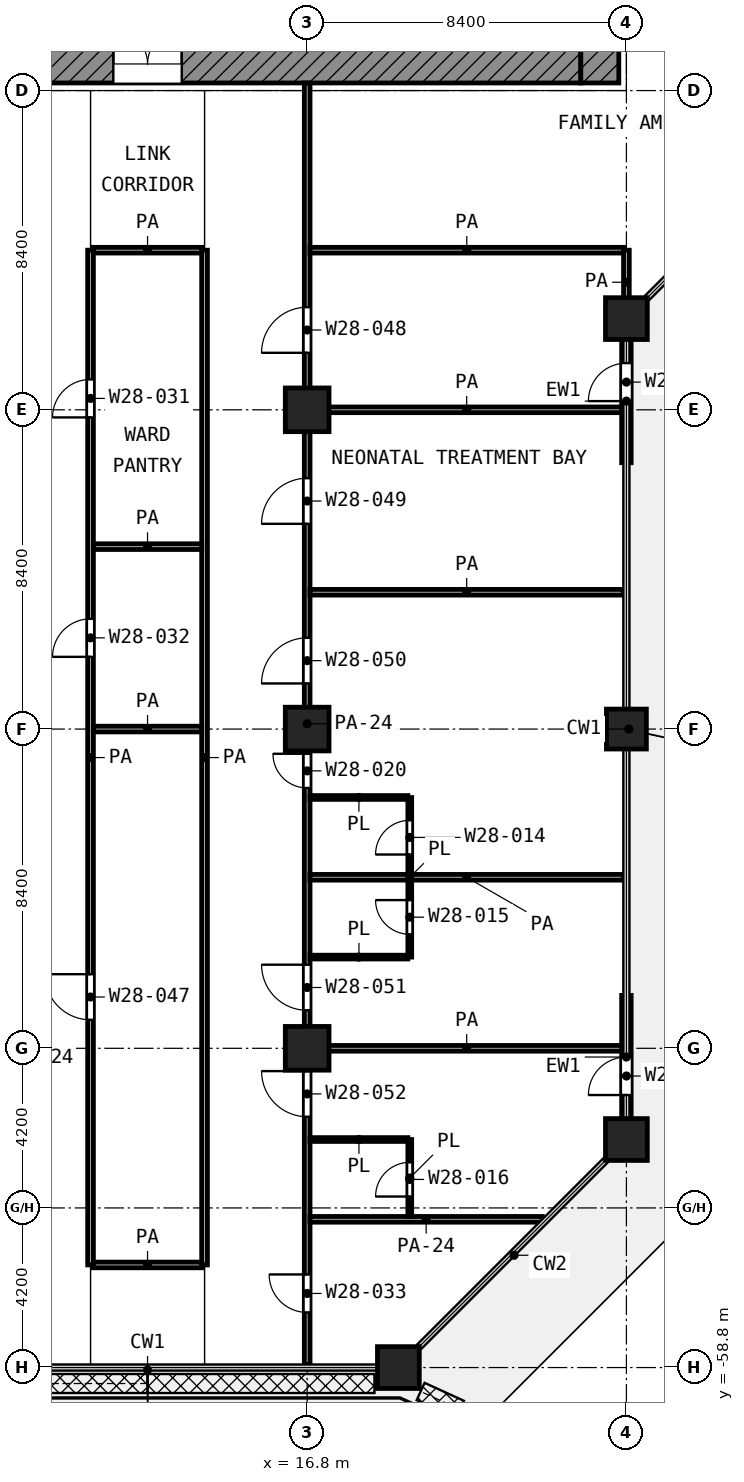
"""IFC4 building model, lengths in metres.
Left out: names, types, materials, properties, quantities, classifications, styles, units other than length and angle.
Written with IfcOpenShell. Run it as: python <this file> out.ifc"""

import sys

from ifc_helpers import new_model, si_unit, direction, frame, frame_2d, origin, origin_2d, place, context, subcontext, project, spatial, rectangle, extrude, element, fill, save


model = new_model("IFC4")
c1 = context("Model", 3, precision=1e-05, world=origin(), true_north=direction((0.0, 1.0)))
c2 = subcontext(c1, "Body", "Model", "MODEL_VIEW")
j1 = project(units=[si_unit("LENGTHUNIT", "METRE"), si_unit("PLANEANGLEUNIT", "RADIAN")], contexts=[c1])
p1 = place(None, origin())
s1 = spatial("IfcSite", under=j1, at=p1, CompositionType="ELEMENT")
p2 = place(p1, origin())
s2 = spatial("IfcBuilding", under=s1, at=p2, CompositionType="ELEMENT")
p3 = place(p2, frame((0.0, 0.0, 145.0)))
s3 = spatial("IfcBuildingStorey", under=s2, at=p3, CompositionType="ELEMENT", Elevation=145.0)
p4 = place(p3, frame((25.2, -31.2, 0.0), z_axis=(0.0, 0.0, 1.0), x_axis=(1.0, 0.0, 0.0)))
e1 = element("IfcColumn", 1, at=p4, inside=s3, PredefinedType="COLUMN", context=c2, shape_type="SweptSolid", body=[
    extrude(rectangle(XDim=1.1, YDim=1.1, at=origin_2d()), origin(), (0.0, 0.0, 1.0), 4.2),
])
for number, where, z_axis, x_axis in (
    (2, (16.8, -33.6, 0.0), (0.0, 0.0, 1.0), (1.0, 0.0, 0.0)),
    (3, (16.8, -42.0, 0.0), (0.0, 0.0, 1.0), (1.0, 0.0, 0.0)),
):
    element("IfcColumn", number, at=place(p3, frame(where, z_axis=z_axis, x_axis=x_axis)), inside=s3, PredefinedType="COLUMN", context=c2, shape_type="SweptSolid", body=[
        extrude(rectangle(XDim=1.15, YDim=1.15, at=origin_2d()), origin(), (0.0, 0.0, 1.0), 4.2),
    ])
p5 = place(p3, frame((25.2, -42.0, 0.0), z_axis=(0.0, 0.0, 1.0), x_axis=(1.0, 0.0, 0.0)))
e4 = element("IfcColumn", 4, at=p5, inside=s3, PredefinedType="COLUMN", context=c2, shape_type="SweptSolid", body=[
    extrude(rectangle(XDim=1.05, YDim=1.05, at=origin_2d()), origin(), (0.0, 0.0, 1.0), 4.2),
])
p6 = place(p3, frame((16.8, -50.4, 0.0), z_axis=(0.0, 0.0, 1.0), x_axis=(1.0, 0.0, 0.0)))
e5 = element("IfcColumn", 5, at=p6, inside=s3, PredefinedType="COLUMN", context=c2, shape_type="SweptSolid", body=[
    extrude(rectangle(XDim=1.15, YDim=1.15, at=origin_2d()), origin(), (0.0, 0.0, 1.0), 4.2),
])
for number, where, z_axis, x_axis in (
    (6, (25.2, -52.8, 0.0), (0.0, 0.0, 1.0), (1.0, 0.0, 0.0)),
    (7, (19.2, -58.8, 0.0), (0.0, 0.0, 1.0), (1.0, 0.0, 0.0)),
):
    element("IfcColumn", number, at=place(p3, frame(where, z_axis=z_axis, x_axis=x_axis)), inside=s3, PredefinedType="COLUMN", context=c2, shape_type="SweptSolid", body=[
        extrude(rectangle(XDim=1.1, YDim=1.1, at=origin_2d()), origin(), (0.0, 0.0, 1.0), 4.2),
    ])
p7 = place(p3, frame((25.2, -52.25, 0.0), z_axis=(0.0, 0.0, 1.0), x_axis=(0.0, 1.0, 0.0)))
e8 = element("IfcWall", 8, at=p7, inside=s3, PredefinedType="SOLIDWALL", context=c2, shape_type="SweptSolid", body=[
    extrude(rectangle(XDim=3.242, YDim=0.25, at=frame_2d((1.621, 0.0))), origin(), (0.0, 0.0, 1.0), 3.48),
])
p8 = place(p7, frame((0.621, 0.0, 0.0)))
e9 = element("IfcOpeningElement", 9, at=p8, cuts=e8, PredefinedType="OPENING", context=c2, shape_type="SweptSolid", body=[
    extrude(rectangle(XDim=1.0, YDim=2.1, at=frame_2d((0.5, 1.05))), frame((0.0, 0.135, 0.0), z_axis=(0.0, -1.0, 0.0), x_axis=(1.0, 0.0, 0.0)), (0.0, 0.0, 1.0), 0.27),
])
p9 = place(p3, frame((25.2, -34.992, 0.0), z_axis=(0.0, 0.0, 1.0), x_axis=(0.0, 1.0, 0.0)))
e10 = element("IfcWall", 10, at=p9, inside=s3, PredefinedType="SOLIDWALL", context=c2, shape_type="SweptSolid", body=[
    extrude(rectangle(XDim=3.242, YDim=0.25, at=frame_2d((1.621, 0.0))), origin(), (0.0, 0.0, 1.0), 3.48),
])
p10 = place(p9, frame((1.621, 0.0, 0.0)))
e11 = element("IfcOpeningElement", 11, at=p10, cuts=e10, PredefinedType="OPENING", context=c2, shape_type="SweptSolid", body=[
    extrude(rectangle(XDim=1.0, YDim=2.1, at=frame_2d((0.5, 1.05))), frame((0.0, 0.135, 0.0), z_axis=(0.0, -1.0, 0.0), x_axis=(1.0, 0.0, 0.0)), (0.0, 0.0, 1.0), 0.27),
])
p11 = place(p3, frame((5.4, -24.5, 0.0), z_axis=(0.0, 0.0, 1.0), x_axis=(1.0, 0.0, 0.0)))
e12 = element("IfcWall", 12, at=p11, inside=s3, PredefinedType="SHEAR", context=c2, shape_type="SweptSolid", body=[
    extrude(rectangle(XDim=18.6, YDim=1.0, at=frame_2d((9.3, 0.0))), origin(), (0.0, 0.0, 1.0), 3.6),
])
p12 = place(p11, frame((6.3, 0.0, 0.0)))
e13 = element("IfcOpeningElement", 13, at=p12, cuts=e12, PredefinedType="OPENING", context=c2, shape_type="SweptSolid", body=[
    extrude(rectangle(XDim=1.8, YDim=2.1, at=frame_2d((0.9, 1.05))), frame((0.0, 0.51, 0.0), z_axis=(0.0, -1.0, 0.0), x_axis=(1.0, 0.0, 0.0)), (0.0, 0.0, 1.0), 1.02),
])
p13 = place(p3, frame((24.5, -25.0, 0.0), z_axis=(0.0, 0.0, 1.0), x_axis=(0.0, 1.0, 0.0)))
e14 = element("IfcWall", 14, at=p13, inside=s3, PredefinedType="SHEAR", context=c2, shape_type="SweptSolid", body=[
    extrude(rectangle(XDim=1.0, YDim=1.0, at=frame_2d((0.5, 0.0))), origin(), (0.0, 0.0, 1.0), 3.6),
])
for number, where, z_axis, x_axis in (
    (15, (16.875, -52.8, 0.0), (0.0, 0.0, 1.0), (1.0, 0.0, 0.0)),
    (16, (16.875, -48.0, 0.0), (0.0, 0.0, 1.0), (1.0, 0.0, 0.0)),
):
    element("IfcWall", number, at=place(p3, frame(where, z_axis=z_axis, x_axis=x_axis)), inside=s3, PredefinedType="PARTITIONING", context=c2, shape_type="SweptSolid", body=[
        extrude(rectangle(XDim=2.575, YDim=0.1, at=frame_2d((1.288, 0.0))), origin(), (0.0, 0.0, 1.0), 3.6),
    ])
p14 = place(p3, frame((16.875, -43.8, 0.0), z_axis=(0.0, 0.0, 1.0), x_axis=(1.0, 0.0, 0.0)))
e17 = element("IfcWall", 17, at=p14, inside=s3, PredefinedType="PARTITIONING", context=c2, shape_type="SweptSolid", body=[
    extrude(rectangle(XDim=2.574, YDim=0.1, at=frame_2d((1.287, 0.0))), origin(), (0.0, 0.0, 1.0), 3.6),
])
p15 = place(p3, frame((19.5, -54.825, 0.0), z_axis=(0.0, 0.0, 1.0), x_axis=(0.0, 1.0, 0.0)))
e18 = element("IfcWall", 18, at=p15, inside=s3, PredefinedType="PARTITIONING", context=c2, shape_type="SweptSolid", body=[
    extrude(rectangle(XDim=2.025, YDim=0.1, at=frame_2d((1.012, 0.0))), origin(), (0.0, 0.0, 1.0), 3.6),
])
p16 = place(p15, frame((0.525, 0.0, 0.0)))
e19 = element("IfcOpeningElement", 19, at=p16, cuts=e18, PredefinedType="OPENING", context=c2, shape_type="SweptSolid", body=[
    extrude(rectangle(XDim=0.9, YDim=2.1, at=frame_2d((0.45, 1.05))), frame((0.0, 0.06, 0.0), z_axis=(0.0, -1.0, 0.0), x_axis=(1.0, 0.0, 0.0)), (0.0, 0.0, 1.0), 0.12),
])
p17 = place(p3, frame((19.5, -48.0, 0.0), z_axis=(0.0, 0.0, 1.0), x_axis=(0.0, 1.0, 0.0)))
e20 = element("IfcWall", 20, at=p17, inside=s3, PredefinedType="PARTITIONING", context=c2, shape_type="SweptSolid", body=[
    extrude(rectangle(XDim=4.198, YDim=0.1, at=frame_2d((2.099, 0.0))), origin(), (0.0, 0.0, 1.0), 3.6),
])
p18 = place(p17, frame((2.699, 0.0, 0.0)))
e21 = element("IfcOpeningElement", 21, at=p18, cuts=e20, PredefinedType="OPENING", context=c2, shape_type="SweptSolid", body=[
    extrude(rectangle(XDim=0.9, YDim=2.1, at=frame_2d((0.45, 1.05))), frame((0.0, 0.06, 0.0), z_axis=(0.0, -1.0, 0.0), x_axis=(1.0, 0.0, 0.0)), (0.0, 0.0, 1.0), 0.12),
])
p19 = place(p17, frame((0.6, 0.0, 0.0)))
e22 = element("IfcOpeningElement", 22, at=p19, cuts=e20, PredefinedType="OPENING", context=c2, shape_type="SweptSolid", body=[
    extrude(rectangle(XDim=0.9, YDim=2.1, at=frame_2d((0.45, 1.05))), frame((0.0, 0.06, 0.0), z_axis=(0.0, -1.0, 0.0), x_axis=(1.0, 0.0, 0.0)), (0.0, 0.0, 1.0), 0.12),
])
p20 = place(p3, frame((11.175, -56.1, 0.0), z_axis=(0.0, 0.0, 1.0), x_axis=(1.0, 0.0, 0.0)))
e23 = element("IfcWall", 23, at=p20, inside=s3, PredefinedType="PARTITIONING", context=c2, shape_type="SweptSolid", body=[
    extrude(rectangle(XDim=2.85, YDim=0.15, at=frame_2d((1.425, 0.0))), origin(), (0.0, 0.0, 1.0), 3.6),
])
p21 = place(p3, frame((16.875, -54.9, 0.0), z_axis=(0.0, 0.0, 1.0), x_axis=(1.0, 0.0, 0.0)))
e24 = element("IfcWall", 24, at=p21, inside=s3, PredefinedType="PARTITIONING", context=c2, shape_type="SweptSolid", body=[
    extrude(rectangle(XDim=6.112, YDim=0.15, at=frame_2d((3.056, 0.0))), origin(), (0.0, 0.0, 1.0), 2.7),
])
for number, where, z_axis, x_axis in (
    (25, (16.875, -50.4, 0.0), (0.0, 0.0, 1.0), (1.0, 0.0, 0.0)),
    (26, (16.875, -45.9, 0.0), (0.0, 0.0, 1.0), (1.0, 0.0, 0.0)),
):
    element("IfcWall", number, at=place(p3, frame(where, z_axis=z_axis, x_axis=x_axis)), inside=s3, PredefinedType="PARTITIONING", context=c2, shape_type="SweptSolid", body=[
        extrude(rectangle(XDim=8.245, YDim=0.15, at=frame_2d((4.123, 0.0))), origin(), (0.0, 0.0, 1.0), 3.6),
    ])
p22 = place(p3, frame((11.175, -42.0, 0.0), z_axis=(0.0, 0.0, 1.0), x_axis=(1.0, 0.0, 0.0)))
e27 = element("IfcWall", 27, at=p22, inside=s3, PredefinedType="PARTITIONING", context=c2, shape_type="SweptSolid", body=[
    extrude(rectangle(XDim=2.85, YDim=0.15, at=frame_2d((1.425, 0.0))), origin(), (0.0, 0.0, 1.0), 3.6),
])
p23 = place(p3, frame((16.875, -38.4, 0.0), z_axis=(0.0, 0.0, 1.0), x_axis=(1.0, 0.0, 0.0)))
e28 = element("IfcWall", 28, at=p23, inside=s3, PredefinedType="PARTITIONING", context=c2, shape_type="SweptSolid", body=[
    extrude(rectangle(XDim=8.245, YDim=0.15, at=frame_2d((4.123, 0.0))), origin(), (0.0, 0.0, 1.0), 3.6),
])
p24 = place(p3, frame((11.175, -37.2, 0.0), z_axis=(0.0, 0.0, 1.0), x_axis=(1.0, 0.0, 0.0)))
e29 = element("IfcWall", 29, at=p24, inside=s3, PredefinedType="PARTITIONING", context=c2, shape_type="SweptSolid", body=[
    extrude(rectangle(XDim=2.85, YDim=0.15, at=frame_2d((1.425, 0.0))), origin(), (0.0, 0.0, 1.0), 3.6),
])
p25 = place(p3, frame((16.875, -33.6, 0.0), z_axis=(0.0, 0.0, 1.0), x_axis=(1.0, 0.0, 0.0)))
e30 = element("IfcWall", 30, at=p25, inside=s3, PredefinedType="PARTITIONING", context=c2, shape_type="SweptSolid", body=[
    extrude(rectangle(XDim=8.245, YDim=0.15, at=frame_2d((4.123, 0.0))), origin(), (0.0, 0.0, 1.0), 3.6),
])
p26 = place(p3, frame((11.175, -29.4, 0.0), z_axis=(0.0, 0.0, 1.0), x_axis=(1.0, 0.0, 0.0)))
e31 = element("IfcWall", 31, at=p26, inside=s3, PredefinedType="PARTITIONING", context=c2, shape_type="SweptSolid", body=[
    extrude(rectangle(XDim=2.85, YDim=0.15, at=frame_2d((1.425, 0.0))), origin(), (0.0, 0.0, 1.0), 3.6),
])
p27 = place(p3, frame((16.875, -29.4, 0.0), z_axis=(0.0, 0.0, 1.0), x_axis=(1.0, 0.0, 0.0)))
e32 = element("IfcWall", 32, at=p27, inside=s3, PredefinedType="PARTITIONING", context=c2, shape_type="SweptSolid", body=[
    extrude(rectangle(XDim=8.25, YDim=0.15, at=frame_2d((4.125, 0.0))), origin(), (0.0, 0.0, 1.0), 3.6),
])
p28 = place(p3, frame((11.1, -56.1, 0.0), z_axis=(0.0, 0.0, 1.0), x_axis=(0.0, 1.0, 0.0)))
e33 = element("IfcWall", 33, at=p28, inside=s3, PredefinedType="PARTITIONING", context=c2, shape_type="SweptSolid", body=[
    extrude(rectangle(XDim=26.7, YDim=0.15, at=frame_2d((13.35, 0.0))), origin(), (0.0, 0.0, 1.0), 3.6),
])
p29 = place(p28, frame((22.3, 0.0, 0.0)))
e34 = element("IfcOpeningElement", 34, at=p29, cuts=e33, PredefinedType="OPENING", context=c2, shape_type="SweptSolid", body=[
    extrude(rectangle(XDim=1.0, YDim=2.1, at=frame_2d((0.5, 1.05))), frame((0.0, 0.085, 0.0), z_axis=(0.0, -1.0, 0.0), x_axis=(1.0, 0.0, 0.0)), (0.0, 0.0, 1.0), 0.17),
])
p30 = place(p28, frame((16.0, 0.0, 0.0)))
e35 = element("IfcOpeningElement", 35, at=p30, cuts=e33, PredefinedType="OPENING", context=c2, shape_type="SweptSolid", body=[
    extrude(rectangle(XDim=1.0, YDim=2.1, at=frame_2d((0.5, 1.05))), frame((0.0, 0.085, 0.0), z_axis=(0.0, -1.0, 0.0), x_axis=(1.0, 0.0, 0.0)), (0.0, 0.0, 1.0), 0.17),
])
p31 = place(p28, frame((6.45, 0.0, 0.0)))
e36 = element("IfcOpeningElement", 36, at=p31, cuts=e33, PredefinedType="OPENING", context=c2, shape_type="SweptSolid", body=[
    extrude(rectangle(XDim=1.2, YDim=2.1, at=frame_2d((0.6, 1.05))), frame((0.0, 0.085, 0.0), z_axis=(0.0, -1.0, 0.0), x_axis=(1.0, 0.0, 0.0)), (0.0, 0.0, 1.0), 0.17),
])
p32 = place(p3, frame((14.1, -56.1, 0.0), z_axis=(0.0, 0.0, 1.0), x_axis=(0.0, 1.0, 0.0)))
e37 = element("IfcWall", 37, at=p32, inside=s3, PredefinedType="PARTITIONING", context=c2, shape_type="SweptSolid", body=[
    extrude(rectangle(XDim=26.7, YDim=0.15, at=frame_2d((13.35, 0.0))), origin(), (0.0, 0.0, 1.0), 3.6),
])
p33 = place(p3, frame((16.8, -58.72, 0.0), z_axis=(0.0, 0.0, 1.0), x_axis=(0.0, 1.0, 0.0)))
e38 = element("IfcWall", 38, at=p33, inside=s3, PredefinedType="PARTITIONING", context=c2, shape_type="SweptSolid", body=[
    extrude(rectangle(XDim=33.72, YDim=0.15, at=frame_2d((16.86, 0.0))), origin(), (0.0, 0.0, 1.0), 2.7),
])
p34 = place(p33, frame((26.62, 0.0, 0.0)))
e39 = element("IfcOpeningElement", 39, at=p34, cuts=e38, PredefinedType="OPENING", context=c2, shape_type="SweptSolid", body=[
    extrude(rectangle(XDim=1.2, YDim=2.1, at=frame_2d((0.6, 1.05))), frame((0.0, 0.085, 0.0), z_axis=(0.0, -1.0, 0.0), x_axis=(1.0, 0.0, 0.0)), (0.0, 0.0, 1.0), 0.17),
])
p35 = place(p33, frame((22.12, 0.0, 0.0)))
e40 = element("IfcOpeningElement", 40, at=p35, cuts=e38, PredefinedType="OPENING", context=c2, shape_type="SweptSolid", body=[
    extrude(rectangle(XDim=1.2, YDim=2.1, at=frame_2d((0.6, 1.05))), frame((0.0, 0.085, 0.0), z_axis=(0.0, -1.0, 0.0), x_axis=(1.0, 0.0, 0.0)), (0.0, 0.0, 1.0), 0.17),
])
p36 = place(p33, frame((17.92, 0.0, 0.0)))
e41 = element("IfcOpeningElement", 41, at=p36, cuts=e38, PredefinedType="OPENING", context=c2, shape_type="SweptSolid", body=[
    extrude(rectangle(XDim=1.2, YDim=2.1, at=frame_2d((0.6, 1.05))), frame((0.0, 0.085, 0.0), z_axis=(0.0, -1.0, 0.0), x_axis=(1.0, 0.0, 0.0)), (0.0, 0.0, 1.0), 0.17),
])
p37 = place(p33, frame((15.17, 0.0, 0.0)))
e42 = element("IfcOpeningElement", 42, at=p37, cuts=e38, PredefinedType="OPENING", context=c2, shape_type="SweptSolid", body=[
    extrude(rectangle(XDim=0.9, YDim=2.1, at=frame_2d((0.45, 1.05))), frame((0.0, 0.085, 0.0), z_axis=(0.0, -1.0, 0.0), x_axis=(1.0, 0.0, 0.0)), (0.0, 0.0, 1.0), 0.17),
])
p38 = place(p33, frame((9.32, 0.0, 0.0)))
e43 = element("IfcOpeningElement", 43, at=p38, cuts=e38, PredefinedType="OPENING", context=c2, shape_type="SweptSolid", body=[
    extrude(rectangle(XDim=1.2, YDim=2.1, at=frame_2d((0.6, 1.05))), frame((0.0, 0.085, 0.0), z_axis=(0.0, -1.0, 0.0), x_axis=(1.0, 0.0, 0.0)), (0.0, 0.0, 1.0), 0.17),
])
p39 = place(p33, frame((6.52, 0.0, 0.0)))
e44 = element("IfcOpeningElement", 44, at=p39, cuts=e38, PredefinedType="OPENING", context=c2, shape_type="SweptSolid", body=[
    extrude(rectangle(XDim=1.2, YDim=2.1, at=frame_2d((0.6, 1.05))), frame((0.0, 0.085, 0.0), z_axis=(0.0, -1.0, 0.0), x_axis=(1.0, 0.0, 0.0)), (0.0, 0.0, 1.0), 0.17),
])
p40 = place(p33, frame((1.37, 0.0, 0.0)))
e45 = element("IfcOpeningElement", 45, at=p40, cuts=e38, PredefinedType="OPENING", context=c2, shape_type="SweptSolid", body=[
    extrude(rectangle(XDim=1.0, YDim=2.1, at=frame_2d((0.5, 1.05))), frame((0.0, 0.085, 0.0), z_axis=(0.0, -1.0, 0.0), x_axis=(1.0, 0.0, 0.0)), (0.0, 0.0, 1.0), 0.17),
])
p41 = place(p3, frame((25.2, -31.087, 0.0), z_axis=(0.0, 0.0, 1.0), x_axis=(0.0, 1.0, 0.0)))
e46 = element("IfcWall", 46, at=p41, inside=s3, PredefinedType="PARTITIONING", context=c2, shape_type="SweptSolid", body=[
    extrude(rectangle(XDim=1.687, YDim=0.15, at=frame_2d((0.844, 0.0))), origin(), (0.0, 0.0, 1.0), 3.6),
])
p42 = place(p8, origin())
e47 = element("IfcDoor", 47, at=p42, inside=s3, OperationType="SINGLE_SWING_LEFT", PredefinedType="DOOR", context=c2, shape_type="SweptSolid", body=[
    extrude(rectangle(XDim=1.0, YDim=2.1, at=frame_2d((0.5, 1.05))), frame((0.0, 0.025, 0.0), z_axis=(0.0, -1.0, 0.0), x_axis=(1.0, 0.0, 0.0)), (0.0, 0.0, 1.0), 0.05),
])
fill(e9, e47)
p43 = place(p10, origin())
e48 = element("IfcDoor", 48, at=p43, inside=s3, OperationType="SINGLE_SWING_LEFT", PredefinedType="DOOR", context=c2, shape_type="SweptSolid", body=[
    extrude(rectangle(XDim=1.0, YDim=2.1, at=frame_2d((0.5, 1.05))), frame((0.0, 0.025, 0.0), z_axis=(0.0, -1.0, 0.0), x_axis=(1.0, 0.0, 0.0)), (0.0, 0.0, 1.0), 0.05),
])
fill(e11, e48)
p44 = place(p12, origin())
e49 = element("IfcDoor", 49, at=p44, inside=s3, OperationType="DOUBLE_DOOR_SINGLE_SWING", PredefinedType="DOOR", context=c2, shape_type="SweptSolid", body=[
    extrude(rectangle(XDim=1.8, YDim=2.1, at=frame_2d((0.9, 1.05))), frame((0.0, 0.025, 0.0), z_axis=(0.0, -1.0, 0.0), x_axis=(1.0, 0.0, 0.0)), (0.0, 0.0, 1.0), 0.05),
])
fill(e13, e49)
p45 = place(p29, origin())
e50 = element("IfcDoor", 50, at=p45, inside=s3, OperationType="SINGLE_SWING_LEFT", PredefinedType="DOOR", context=c2, shape_type="SweptSolid", body=[
    extrude(rectangle(XDim=1.0, YDim=2.1, at=frame_2d((0.5, 1.05))), frame((0.0, 0.025, 0.0), z_axis=(0.0, -1.0, 0.0), x_axis=(1.0, 0.0, 0.0)), (0.0, 0.0, 1.0), 0.05),
])
fill(e34, e50)
p46 = place(p30, origin())
e51 = element("IfcDoor", 51, at=p46, inside=s3, OperationType="SINGLE_SWING_LEFT", PredefinedType="DOOR", context=c2, shape_type="SweptSolid", body=[
    extrude(rectangle(XDim=1.0, YDim=2.1, at=frame_2d((0.5, 1.05))), frame((0.0, 0.025, 0.0), z_axis=(0.0, -1.0, 0.0), x_axis=(1.0, 0.0, 0.0)), (0.0, 0.0, 1.0), 0.05),
])
fill(e35, e51)
p47 = place(p31, origin())
e52 = element("IfcDoor", 52, at=p47, inside=s3, OperationType="SINGLE_SWING_RIGHT", PredefinedType="DOOR", context=c2, shape_type="SweptSolid", body=[
    extrude(rectangle(XDim=1.2, YDim=2.1, at=frame_2d((0.6, 1.05))), frame((0.0, 0.025, 0.0), z_axis=(0.0, -1.0, 0.0), x_axis=(1.0, 0.0, 0.0)), (0.0, 0.0, 1.0), 0.05),
])
fill(e36, e52)
p48 = place(p34, origin())
e53 = element("IfcDoor", 53, at=p48, inside=s3, OperationType="SINGLE_SWING_LEFT", PredefinedType="DOOR", context=c2, shape_type="SweptSolid", body=[
    extrude(rectangle(XDim=1.2, YDim=2.1, at=frame_2d((0.6, 1.05))), frame((0.0, 0.025, 0.0), z_axis=(0.0, -1.0, 0.0), x_axis=(1.0, 0.0, 0.0)), (0.0, 0.0, 1.0), 0.05),
])
fill(e39, e53)
p49 = place(p35, origin())
e54 = element("IfcDoor", 54, at=p49, inside=s3, OperationType="SINGLE_SWING_LEFT", PredefinedType="DOOR", context=c2, shape_type="SweptSolid", body=[
    extrude(rectangle(XDim=1.2, YDim=2.1, at=frame_2d((0.6, 1.05))), frame((0.0, 0.025, 0.0), z_axis=(0.0, -1.0, 0.0), x_axis=(1.0, 0.0, 0.0)), (0.0, 0.0, 1.0), 0.05),
])
fill(e40, e54)
p50 = place(p36, origin())
e55 = element("IfcDoor", 55, at=p50, inside=s3, OperationType="SINGLE_SWING_LEFT", PredefinedType="DOOR", context=c2, shape_type="SweptSolid", body=[
    extrude(rectangle(XDim=1.2, YDim=2.1, at=frame_2d((0.6, 1.05))), frame((0.0, 0.025, 0.0), z_axis=(0.0, -1.0, 0.0), x_axis=(1.0, 0.0, 0.0)), (0.0, 0.0, 1.0), 0.05),
])
fill(e41, e55)
p51 = place(p37, origin())
e56 = element("IfcDoor", 56, at=p51, inside=s3, OperationType="SINGLE_SWING_RIGHT", PredefinedType="DOOR", context=c2, shape_type="SweptSolid", body=[
    extrude(rectangle(XDim=0.9, YDim=2.1, at=frame_2d((0.45, 1.05))), frame((0.0, 0.025, 0.0), z_axis=(0.0, -1.0, 0.0), x_axis=(1.0, 0.0, 0.0)), (0.0, 0.0, 1.0), 0.05),
])
fill(e42, e56)
p52 = place(p18, origin())
e57 = element("IfcDoor", 57, at=p52, inside=s3, OperationType="SINGLE_SWING_LEFT", PredefinedType="DOOR", context=c2, shape_type="SweptSolid", body=[
    extrude(rectangle(XDim=0.9, YDim=2.1, at=frame_2d((0.45, 1.05))), frame((0.0, 0.025, 0.0), z_axis=(0.0, -1.0, 0.0), x_axis=(1.0, 0.0, 0.0)), (0.0, 0.0, 1.0), 0.05),
])
fill(e21, e57)
p53 = place(p38, origin())
e58 = element("IfcDoor", 58, at=p53, inside=s3, OperationType="SINGLE_SWING_RIGHT", PredefinedType="DOOR", context=c2, shape_type="SweptSolid", body=[
    extrude(rectangle(XDim=1.2, YDim=2.1, at=frame_2d((0.6, 1.05))), frame((0.0, 0.025, 0.0), z_axis=(0.0, -1.0, 0.0), x_axis=(1.0, 0.0, 0.0)), (0.0, 0.0, 1.0), 0.05),
])
fill(e43, e58)
p54 = place(p19, origin())
e59 = element("IfcDoor", 59, at=p54, inside=s3, OperationType="SINGLE_SWING_RIGHT", PredefinedType="DOOR", context=c2, shape_type="SweptSolid", body=[
    extrude(rectangle(XDim=0.9, YDim=2.1, at=frame_2d((0.45, 1.05))), frame((0.0, 0.025, 0.0), z_axis=(0.0, -1.0, 0.0), x_axis=(1.0, 0.0, 0.0)), (0.0, 0.0, 1.0), 0.05),
])
fill(e22, e59)
p55 = place(p39, origin())
e60 = element("IfcDoor", 60, at=p55, inside=s3, OperationType="SINGLE_SWING_RIGHT", PredefinedType="DOOR", context=c2, shape_type="SweptSolid", body=[
    extrude(rectangle(XDim=1.2, YDim=2.1, at=frame_2d((0.6, 1.05))), frame((0.0, 0.025, 0.0), z_axis=(0.0, -1.0, 0.0), x_axis=(1.0, 0.0, 0.0)), (0.0, 0.0, 1.0), 0.05),
])
fill(e44, e60)
p56 = place(p16, origin())
e61 = element("IfcDoor", 61, at=p56, inside=s3, OperationType="SINGLE_SWING_LEFT", PredefinedType="DOOR", context=c2, shape_type="SweptSolid", body=[
    extrude(rectangle(XDim=0.9, YDim=2.1, at=frame_2d((0.45, 1.05))), frame((0.0, 0.025, 0.0), z_axis=(0.0, -1.0, 0.0), x_axis=(1.0, 0.0, 0.0)), (0.0, 0.0, 1.0), 0.05),
])
fill(e19, e61)
p57 = place(p40, origin())
e62 = element("IfcDoor", 62, at=p57, inside=s3, OperationType="SINGLE_SWING_RIGHT", PredefinedType="DOOR", context=c2, shape_type="SweptSolid", body=[
    extrude(rectangle(XDim=1.0, YDim=2.1, at=frame_2d((0.5, 1.05))), frame((0.0, 0.025, 0.0), z_axis=(0.0, -1.0, 0.0), x_axis=(1.0, 0.0, 0.0)), (0.0, 0.0, 1.0), 0.05),
])
fill(e45, e62)
save(model, sys.argv[1])
